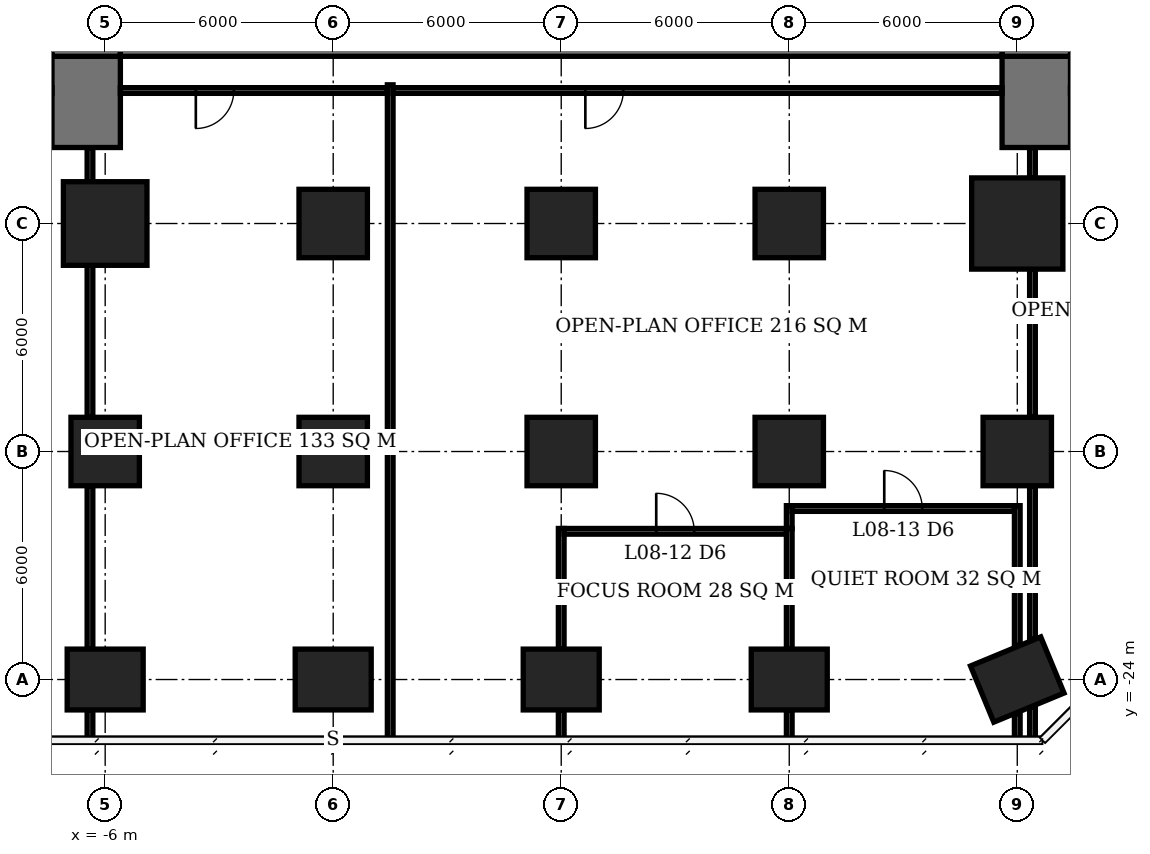
"""IFC4 building model, lengths in metres.
Left out: names, types, materials, properties, quantities, classifications, styles, units other than length and angle.
Written with IfcOpenShell. Run it as: python <this file> out.ifc"""

import sys

from ifc_helpers import new_model, si_unit, direction, frame, frame_2d, origin, origin_2d, place, context, subcontext, project, spatial, rectangle, extrude, element, fill, save


model = new_model("IFC4")
c1 = context("Model", 3, precision=1e-05, world=origin(), true_north=direction((0.0, 1.0)))
c2 = subcontext(c1, "Body", "Model", "MODEL_VIEW")
j1 = project(units=[si_unit("LENGTHUNIT", "METRE"), si_unit("PLANEANGLEUNIT", "RADIAN")], contexts=[c1])
p1 = place(None, origin())
s1 = spatial("IfcSite", under=j1, at=p1, CompositionType="ELEMENT")
p2 = place(p1, origin())
s2 = spatial("IfcBuilding", under=s1, at=p2, CompositionType="ELEMENT")
p3 = place(p2, frame((0.0, 0.0, 37.7)))
s3 = spatial("IfcBuildingStorey", under=s2, at=p3, CompositionType="ELEMENT", Elevation=37.7)
p4 = place(p3, frame((-6.0, -24.0, 0.0), z_axis=(0.0, 0.0, 1.0), x_axis=(1.0, 0.0, 0.0)))
e1 = element("IfcColumn", 1, at=p4, inside=s3, PredefinedType="COLUMN", context=c2, shape_type="SweptSolid", body=[
    extrude(rectangle(XDim=2.0, YDim=1.6, at=origin_2d()), origin(), (0.0, 0.0, 1.0), 3.9),
])
p5 = place(p3, frame((-6.0, -18.0, 0.0), z_axis=(0.0, 0.0, 1.0), x_axis=(1.0, 0.0, 0.0)))
e2 = element("IfcColumn", 2, at=p5, inside=s3, PredefinedType="COLUMN", context=c2, shape_type="SweptSolid", body=[
    extrude(rectangle(XDim=1.8, YDim=1.8, at=origin_2d()), origin(), (0.0, 0.0, 1.0), 3.9),
])
p6 = place(p3, frame((-6.0, -12.0, 0.0), z_axis=(0.0, 0.0, 1.0), x_axis=(1.0, 0.0, 0.0)))
e3 = element("IfcColumn", 3, at=p6, inside=s3, PredefinedType="COLUMN", context=c2, shape_type="SweptSolid", body=[
    extrude(rectangle(XDim=2.2, YDim=2.2, at=origin_2d()), origin(), (0.0, 0.0, 1.0), 3.9),
])
p7 = place(p3, frame((0.0, -24.0, 0.0), z_axis=(0.0, 0.0, 1.0), x_axis=(1.0, 0.0, 0.0)))
e4 = element("IfcColumn", 4, at=p7, inside=s3, PredefinedType="COLUMN", context=c2, shape_type="SweptSolid", body=[
    extrude(rectangle(XDim=2.0, YDim=1.6, at=origin_2d()), origin(), (0.0, 0.0, 1.0), 3.9),
])
for number, where, z_axis, x_axis in (
    (5, (0.0, -18.0, 0.0), (0.0, 0.0, 1.0), (1.0, 0.0, 0.0)),
    (6, (0.0, -12.0, 0.0), (0.0, 0.0, 1.0), (1.0, 0.0, 0.0)),
):
    element("IfcColumn", number, at=place(p3, frame(where, z_axis=z_axis, x_axis=x_axis)), inside=s3, PredefinedType="COLUMN", context=c2, shape_type="SweptSolid", body=[
        extrude(rectangle(XDim=1.8, YDim=1.8, at=origin_2d()), origin(), (0.0, 0.0, 1.0), 3.9),
    ])
p8 = place(p3, frame((6.0, -24.0, 0.0), z_axis=(0.0, 0.0, 1.0), x_axis=(1.0, 0.0, 0.0)))
e7 = element("IfcColumn", 7, at=p8, inside=s3, PredefinedType="COLUMN", context=c2, shape_type="SweptSolid", body=[
    extrude(rectangle(XDim=2.0, YDim=1.6, at=origin_2d()), origin(), (0.0, 0.0, 1.0), 3.9),
])
for number, where, z_axis, x_axis in (
    (8, (6.0, -18.0, 0.0), (0.0, 0.0, 1.0), (1.0, 0.0, 0.0)),
    (9, (6.0, -12.0, 0.0), (0.0, 0.0, 1.0), (1.0, 0.0, 0.0)),
):
    element("IfcColumn", number, at=place(p3, frame(where, z_axis=z_axis, x_axis=x_axis)), inside=s3, PredefinedType="COLUMN", context=c2, shape_type="SweptSolid", body=[
        extrude(rectangle(XDim=1.8, YDim=1.8, at=origin_2d()), origin(), (0.0, 0.0, 1.0), 3.9),
    ])
p9 = place(p3, frame((12.0, -24.0, 0.0), z_axis=(0.0, 0.0, 1.0), x_axis=(1.0, 0.0, 0.0)))
e10 = element("IfcColumn", 10, at=p9, inside=s3, PredefinedType="COLUMN", context=c2, shape_type="SweptSolid", body=[
    extrude(rectangle(XDim=2.0, YDim=1.6, at=origin_2d()), origin(), (0.0, 0.0, 1.0), 3.9),
])
for number, where, z_axis, x_axis in (
    (11, (12.0, -18.0, 0.0), (0.0, 0.0, 1.0), (1.0, 0.0, 0.0)),
    (12, (12.0, -12.0, 0.0), (0.0, 0.0, 1.0), (1.0, 0.0, 0.0)),
):
    element("IfcColumn", number, at=place(p3, frame(where, z_axis=z_axis, x_axis=x_axis)), inside=s3, PredefinedType="COLUMN", context=c2, shape_type="SweptSolid", body=[
        extrude(rectangle(XDim=1.8, YDim=1.8, at=origin_2d()), origin(), (0.0, 0.0, 1.0), 3.9),
    ])
p10 = place(p3, frame((18.0, -24.0, 0.0), z_axis=(0.0, 0.0, 1.0), x_axis=(-0.923879532511, -0.382683432365, 0.0)))
e13 = element("IfcColumn", 13, at=p10, inside=s3, PredefinedType="COLUMN", context=c2, shape_type="SweptSolid", body=[
    extrude(rectangle(XDim=2.0, YDim=1.6, at=origin_2d()), origin(), (0.0, 0.0, 1.0), 3.9),
])
p11 = place(p3, frame((18.0, -18.0, 0.0), z_axis=(0.0, 0.0, 1.0), x_axis=(1.0, 0.0, 0.0)))
e14 = element("IfcColumn", 14, at=p11, inside=s3, PredefinedType="COLUMN", context=c2, shape_type="SweptSolid", body=[
    extrude(rectangle(XDim=1.8, YDim=1.8, at=origin_2d()), origin(), (0.0, 0.0, 1.0), 3.9),
])
p12 = place(p3, frame((18.0, -12.0, 0.0), z_axis=(0.0, 0.0, 1.0), x_axis=(1.0, 0.0, 0.0)))
e15 = element("IfcColumn", 15, at=p12, inside=s3, PredefinedType="COLUMN", context=c2, shape_type="SweptSolid", body=[
    extrude(rectangle(XDim=2.4, YDim=2.4, at=origin_2d()), origin(), (0.0, 0.0, 1.0), 3.9),
])
p13 = place(p3, frame((-5.6, -6.6, 0.0), z_axis=(0.0, 0.0, 1.0), x_axis=(1.0, 0.0, 0.0)))
e16 = element("IfcWall", 16, at=p13, inside=s3, PredefinedType="SHEAR", context=c2, shape_type="SweptSolid", body=[
    extrude(rectangle(XDim=23.2, YDim=2.0, at=frame_2d((11.6, 0.0))), origin(), (0.0, 0.0, 1.0), 3.9),
])
p14 = place(p3, frame((-6.5, -7.6, 0.0), z_axis=(0.0, 0.0, 1.0), x_axis=(0.0, 1.0, 0.0)))
e17 = element("IfcWall", 17, at=p14, inside=s3, PredefinedType="SHEAR", context=c2, shape_type="SweptSolid", body=[
    extrude(rectangle(XDim=21.2, YDim=1.8, at=frame_2d((10.6, 0.0))), origin(), (0.0, 0.0, 1.0), 3.9),
])
p15 = place(p14, frame((7.8, 0.0, 0.0)))
e18 = element("IfcOpeningElement", 18, at=p15, cuts=e17, PredefinedType="OPENING", context=c2, shape_type="SweptSolid", body=[
    extrude(rectangle(XDim=1.8, YDim=2.4, at=frame_2d((0.9, 1.2))), frame((0.0, 0.91, 0.0), z_axis=(0.0, -1.0, 0.0), x_axis=(1.0, 0.0, 0.0)), (0.0, 0.0, 1.0), 1.82),
])
p16 = place(p3, frame((18.5, -7.6, 0.0), z_axis=(0.0, 0.0, 1.0), x_axis=(0.0, 1.0, 0.0)))
e19 = element("IfcWall", 19, at=p16, inside=s3, PredefinedType="SHEAR", context=c2, shape_type="SweptSolid", body=[
    extrude(rectangle(XDim=21.2, YDim=1.8, at=frame_2d((10.6, 0.0))), origin(), (0.0, 0.0, 1.0), 3.9),
])
p17 = place(p16, frame((9.2, 0.0, 0.0)))
e20 = element("IfcOpeningElement", 20, at=p17, cuts=e19, PredefinedType="OPENING", context=c2, shape_type="SweptSolid", body=[
    extrude(rectangle(XDim=1.8, YDim=2.4, at=frame_2d((0.9, 1.2))), frame((0.0, 0.91, 0.0), z_axis=(0.0, -1.0, 0.0), x_axis=(1.0, 0.0, 0.0)), (0.0, 0.0, 1.0), 1.82),
])
for number, where, z_axis, x_axis in (
    (21, (-6.5, -10.0, 0.0), (0.0, 0.0, 1.0), (0.0, 1.0, 0.0)),
    (22, (18.5, -10.0, 0.0), (0.0, 0.0, 1.0), (0.0, 1.0, 0.0)),
):
    element("IfcWall", number, at=place(p3, frame(where, z_axis=z_axis, x_axis=x_axis)), inside=s3, PredefinedType="SHEAR", context=c2, shape_type="SweptSolid", body=[
        extrude(rectangle(XDim=2.4, YDim=1.8, at=frame_2d((1.2, 0.0))), origin(), (0.0, 0.0, 1.0), 3.9),
    ])
p18 = place(p3, frame((6.075, -20.1, 0.0), z_axis=(0.0, 0.0, 1.0), x_axis=(1.0, 0.0, 0.0)))
e23 = element("IfcWall", 23, at=p18, inside=s3, PredefinedType="PARTITIONING", context=c2, shape_type="SweptSolid", body=[
    extrude(rectangle(XDim=5.85, YDim=0.15, at=frame_2d((2.925, 0.0))), origin(), (0.0, 0.0, 1.0), 3.65),
])
p19 = place(p18, frame((2.425, 0.0, 0.0)))
e24 = element("IfcOpeningElement", 24, at=p19, cuts=e23, PredefinedType="OPENING", context=c2, shape_type="SweptSolid", body=[
    extrude(rectangle(XDim=1.0, YDim=2.1, at=frame_2d((0.5, 1.05))), frame((0.0, 0.085, 0.0), z_axis=(0.0, -1.0, 0.0), x_axis=(1.0, 0.0, 0.0)), (0.0, 0.0, 1.0), 0.17),
])
p20 = place(p3, frame((12.075, -19.5, 0.0), z_axis=(0.0, 0.0, 1.0), x_axis=(1.0, 0.0, 0.0)))
e25 = element("IfcWall", 25, at=p20, inside=s3, PredefinedType="PARTITIONING", context=c2, shape_type="SweptSolid", body=[
    extrude(rectangle(XDim=5.85, YDim=0.15, at=frame_2d((2.925, 0.0))), origin(), (0.0, 0.0, 1.0), 3.65),
])
p21 = place(p20, frame((2.425, 0.0, 0.0)))
e26 = element("IfcOpeningElement", 26, at=p21, cuts=e25, PredefinedType="OPENING", context=c2, shape_type="SweptSolid", body=[
    extrude(rectangle(XDim=1.0, YDim=2.1, at=frame_2d((0.5, 1.05))), frame((0.0, 0.085, 0.0), z_axis=(0.0, -1.0, 0.0), x_axis=(1.0, 0.0, 0.0)), (0.0, 0.0, 1.0), 0.17),
])
p22 = place(p3, frame((6.0, -25.6, 0.0), z_axis=(0.0, 0.0, 1.0), x_axis=(0.0, 1.0, 0.0)))
e27 = element("IfcWall", 27, at=p22, inside=s3, PredefinedType="PARTITIONING", context=c2, shape_type="SweptSolid", body=[
    extrude(rectangle(XDim=0.8, YDim=0.15, at=frame_2d((0.4, 0.0))), origin(), (0.0, 0.0, 1.0), 3.65),
])
p23 = place(p3, frame((6.0, -23.2, 0.0), z_axis=(0.0, 0.0, 1.0), x_axis=(0.0, 1.0, 0.0)))
e28 = element("IfcWall", 28, at=p23, inside=s3, PredefinedType="PARTITIONING", context=c2, shape_type="SweptSolid", body=[
    extrude(rectangle(XDim=3.175, YDim=0.15, at=frame_2d((1.587, 0.0))), origin(), (0.0, 0.0, 1.0), 3.65),
])
p24 = place(p3, frame((12.0, -25.6, 0.0), z_axis=(0.0, 0.0, 1.0), x_axis=(0.0, 1.0, 0.0)))
e29 = element("IfcWall", 29, at=p24, inside=s3, PredefinedType="PARTITIONING", context=c2, shape_type="SweptSolid", body=[
    extrude(rectangle(XDim=0.8, YDim=0.15, at=frame_2d((0.4, 0.0))), origin(), (0.0, 0.0, 1.0), 3.65),
])
p25 = place(p3, frame((12.0, -23.2, 0.0), z_axis=(0.0, 0.0, 1.0), x_axis=(0.0, 1.0, 0.0)))
e30 = element("IfcWall", 30, at=p25, inside=s3, PredefinedType="PARTITIONING", context=c2, shape_type="SweptSolid", body=[
    extrude(rectangle(XDim=3.175, YDim=0.15, at=frame_2d((1.587, 0.0))), origin(), (0.0, 0.0, 1.0), 3.65),
])
p26 = place(p3, frame((12.0, -20.025, 0.0), z_axis=(0.0, 0.0, 1.0), x_axis=(0.0, 1.0, 0.0)))
e31 = element("IfcWall", 31, at=p26, inside=s3, PredefinedType="PARTITIONING", context=c2, shape_type="SweptSolid", body=[
    extrude(rectangle(XDim=0.6, YDim=0.15, at=frame_2d((0.3, 0.0))), origin(), (0.0, 0.0, 1.0), 3.65),
])
p27 = place(p3, frame((18.0, -25.6, 0.0), z_axis=(0.0, 0.0, 1.0), x_axis=(0.0, 1.0, 0.0)))
e32 = element("IfcWall", 32, at=p27, inside=s3, PredefinedType="PARTITIONING", context=c2, shape_type="SweptSolid", body=[
    extrude(rectangle(XDim=0.703, YDim=0.15, at=frame_2d((0.352, 0.0))), origin(), (0.0, 0.0, 1.0), 3.65),
])
p28 = place(p3, frame((18.0, -23.103, 0.0), z_axis=(0.0, 0.0, 1.0), x_axis=(0.0, 1.0, 0.0)))
e33 = element("IfcWall", 33, at=p28, inside=s3, PredefinedType="PARTITIONING", context=c2, shape_type="SweptSolid", body=[
    extrude(rectangle(XDim=3.678, YDim=0.15, at=frame_2d((1.839, 0.0))), origin(), (0.0, 0.0, 1.0), 3.65),
])
p29 = place(p3, frame((-6.4, -25.6, 0.0), z_axis=(0.0, 0.0, 1.0), x_axis=(0.0, 1.0, 0.0)))
e34 = element("IfcWall", 34, at=p29, inside=s3, PredefinedType="PARTITIONING", context=c2, shape_type="SweptSolid", body=[
    extrude(rectangle(XDim=0.8, YDim=0.15, at=frame_2d((0.4, 0.0))), origin(), (0.0, 0.0, 1.0), 3.65),
])
p30 = place(p3, frame((-6.4, -23.2, 0.0), z_axis=(0.0, 0.0, 1.0), x_axis=(0.0, 1.0, 0.0)))
e35 = element("IfcWall", 35, at=p30, inside=s3, PredefinedType="PARTITIONING", context=c2, shape_type="SweptSolid", body=[
    extrude(rectangle(XDim=4.3, YDim=0.15, at=frame_2d((2.15, 0.0))), origin(), (0.0, 0.0, 1.0), 3.65),
])
p31 = place(p3, frame((-6.4, -17.1, 0.0), z_axis=(0.0, 0.0, 1.0), x_axis=(0.0, 1.0, 0.0)))
e36 = element("IfcWall", 36, at=p31, inside=s3, PredefinedType="PARTITIONING", context=c2, shape_type="SweptSolid", body=[
    extrude(rectangle(XDim=4.0, YDim=0.15, at=frame_2d((2.0, 0.0))), origin(), (0.0, 0.0, 1.0), 3.65),
])
p32 = place(p3, frame((-6.4, -10.9, 0.0), z_axis=(0.0, 0.0, 1.0), x_axis=(0.0, 1.0, 0.0)))
e37 = element("IfcWall", 37, at=p32, inside=s3, PredefinedType="PARTITIONING", context=c2, shape_type="SweptSolid", body=[
    extrude(rectangle(XDim=0.9, YDim=0.15, at=frame_2d((0.45, 0.0))), origin(), (0.0, 0.0, 1.0), 3.65),
])
p33 = place(p3, frame((1.425, -8.5, 0.0), z_axis=(0.0, 0.0, 1.0), x_axis=(-1.0, 0.0, 0.0)))
e38 = element("IfcWall", 38, at=p33, inside=s3, PredefinedType="PARTITIONING", context=c2, shape_type="SweptSolid", body=[
    extrude(rectangle(XDim=7.025, YDim=0.15, at=frame_2d((3.513, 0.0))), origin(), (0.0, 0.0, 1.0), 3.65),
])
p34 = place(p33, frame((4.04, 0.0, 0.0)))
e39 = element("IfcOpeningElement", 39, at=p34, cuts=e38, PredefinedType="OPENING", context=c2, shape_type="SweptSolid", body=[
    extrude(rectangle(XDim=1.0, YDim=2.1, at=frame_2d((0.5, 1.05))), frame((0.0, 0.085, 0.0), z_axis=(0.0, -1.0, 0.0), x_axis=(1.0, 0.0, 0.0)), (0.0, 0.0, 1.0), 0.17),
])
p35 = place(p3, frame((1.5, -25.6, 0.0), z_axis=(0.0, 0.0, 1.0), x_axis=(0.0, 1.0, 0.0)))
e40 = element("IfcWall", 40, at=p35, inside=s3, PredefinedType="PARTITIONING", context=c2, shape_type="SweptSolid", body=[
    extrude(rectangle(XDim=17.25, YDim=0.15, at=frame_2d((8.625, 0.0))), origin(), (0.0, 0.0, 1.0), 3.65),
])
p36 = place(p3, frame((17.6, -8.5, 0.0), z_axis=(0.0, 0.0, 1.0), x_axis=(-1.0, 0.0, 0.0)))
e41 = element("IfcWall", 41, at=p36, inside=s3, PredefinedType="PARTITIONING", context=c2, shape_type="SweptSolid", body=[
    extrude(rectangle(XDim=16.025, YDim=0.15, at=frame_2d((8.013, 0.0))), origin(), (0.0, 0.0, 1.0), 3.65),
])
p37 = place(p36, frame((9.965, 0.0, 0.0)))
e42 = element("IfcOpeningElement", 42, at=p37, cuts=e41, PredefinedType="OPENING", context=c2, shape_type="SweptSolid", body=[
    extrude(rectangle(XDim=1.0, YDim=2.1, at=frame_2d((0.5, 1.05))), frame((0.0, 0.085, 0.0), z_axis=(0.0, -1.0, 0.0), x_axis=(1.0, 0.0, 0.0)), (0.0, 0.0, 1.0), 0.17),
])
p38 = place(p3, frame((18.4, -25.6, 0.0), z_axis=(0.0, 0.0, 1.0), x_axis=(0.0, 1.0, 0.0)))
e43 = element("IfcWall", 43, at=p38, inside=s3, PredefinedType="PARTITIONING", context=c2, shape_type="SweptSolid", body=[
    extrude(rectangle(XDim=0.869, YDim=0.15, at=frame_2d((0.435, 0.0))), origin(), (0.0, 0.0, 1.0), 3.65),
])
p39 = place(p3, frame((18.4, -22.937, 0.0), z_axis=(0.0, 0.0, 1.0), x_axis=(0.0, 1.0, 0.0)))
e44 = element("IfcWall", 44, at=p39, inside=s3, PredefinedType="PARTITIONING", context=c2, shape_type="SweptSolid", body=[
    extrude(rectangle(XDim=4.037, YDim=0.15, at=frame_2d((2.019, 0.0))), origin(), (0.0, 0.0, 1.0), 3.65),
])
p40 = place(p3, frame((18.4, -17.1, 0.0), z_axis=(0.0, 0.0, 1.0), x_axis=(0.0, 1.0, 0.0)))
e45 = element("IfcWall", 45, at=p40, inside=s3, PredefinedType="PARTITIONING", context=c2, shape_type="SweptSolid", body=[
    extrude(rectangle(XDim=3.9, YDim=0.15, at=frame_2d((1.95, 0.0))), origin(), (0.0, 0.0, 1.0), 3.65),
])
p41 = place(p3, frame((18.4, -10.8, 0.0), z_axis=(0.0, 0.0, 1.0), x_axis=(0.0, 1.0, 0.0)))
e46 = element("IfcWall", 46, at=p41, inside=s3, PredefinedType="PARTITIONING", context=c2, shape_type="SweptSolid", body=[
    extrude(rectangle(XDim=0.8, YDim=0.15, at=frame_2d((0.4, 0.0))), origin(), (0.0, 0.0, 1.0), 3.65),
])
p42 = place(p3, frame((19.4, -8.5, 0.0), z_axis=(0.0, 0.0, 1.0), x_axis=(1.0, 0.0, 0.0)))
e47 = element("IfcWall", 47, at=p42, inside=s3, PredefinedType="PARTITIONING", context=c2, shape_type="SweptSolid", body=[
    extrude(rectangle(XDim=1.175, YDim=0.15, at=frame_2d((0.587, 0.0))), origin(), (0.0, 0.0, 1.0), 3.65),
])
p43 = place(p19, origin())
e48 = element("IfcDoor", 48, at=p43, inside=s3, OperationType="SINGLE_SWING_LEFT", PredefinedType="DOOR", context=c2, shape_type="SweptSolid", body=[
    extrude(rectangle(XDim=1.0, YDim=2.1, at=frame_2d((0.5, 1.05))), frame((0.0, 0.025, 0.0), z_axis=(0.0, -1.0, 0.0), x_axis=(1.0, 0.0, 0.0)), (0.0, 0.0, 1.0), 0.05),
])
fill(e24, e48)
p44 = place(p21, origin())
e49 = element("IfcDoor", 49, at=p44, inside=s3, OperationType="SINGLE_SWING_LEFT", PredefinedType="DOOR", context=c2, shape_type="SweptSolid", body=[
    extrude(rectangle(XDim=1.0, YDim=2.1, at=frame_2d((0.5, 1.05))), frame((0.0, 0.025, 0.0), z_axis=(0.0, -1.0, 0.0), x_axis=(1.0, 0.0, 0.0)), (0.0, 0.0, 1.0), 0.05),
])
fill(e26, e49)
p45 = place(p34, origin())
e50 = element("IfcDoor", 50, at=p45, inside=s3, OperationType="SINGLE_SWING_RIGHT", PredefinedType="DOOR", context=c2, shape_type="SweptSolid", body=[
    extrude(rectangle(XDim=1.0, YDim=2.1, at=frame_2d((0.5, 1.05))), frame((0.0, 0.025, 0.0), z_axis=(0.0, -1.0, 0.0), x_axis=(1.0, 0.0, 0.0)), (0.0, 0.0, 1.0), 0.05),
])
fill(e39, e50)
p46 = place(p37, origin())
e51 = element("IfcDoor", 51, at=p46, inside=s3, OperationType="SINGLE_SWING_RIGHT", PredefinedType="DOOR", context=c2, shape_type="SweptSolid", body=[
    extrude(rectangle(XDim=1.0, YDim=2.1, at=frame_2d((0.5, 1.05))), frame((0.0, 0.025, 0.0), z_axis=(0.0, -1.0, 0.0), x_axis=(1.0, 0.0, 0.0)), (0.0, 0.0, 1.0), 0.05),
])
fill(e42, e51)
save(model, sys.argv[1])
